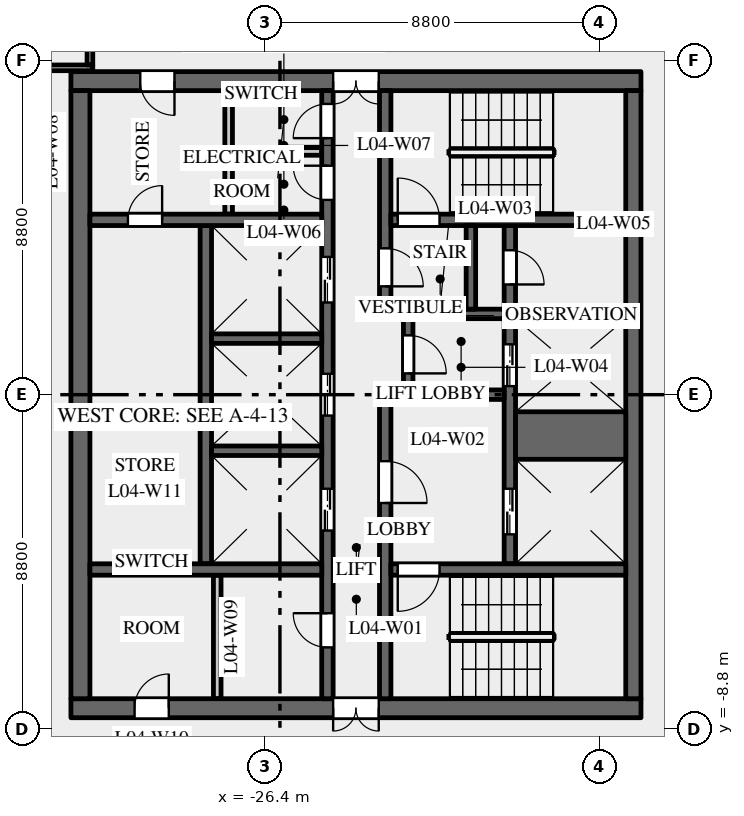
"""IFC4 building model, lengths in metres.
Left out: names, types, materials, properties, quantities, classifications, styles, units other than length and angle.
Written with IfcOpenShell. Run it as: python <this file> out.ifc"""

import sys

from ifc_helpers import new_model, si_unit, direction, frame, frame_2d, origin, place, context, subcontext, project, spatial, rectangle, extrude, element, fill, save


model = new_model("IFC4")
c1 = context("Model", 3, precision=1e-05, world=origin(), true_north=direction((0.0, 1.0)))
c2 = subcontext(c1, "Body", "Model", "MODEL_VIEW")
j1 = project(units=[si_unit("LENGTHUNIT", "METRE"), si_unit("PLANEANGLEUNIT", "RADIAN")], contexts=[c1])
p1 = place(None, origin())
s1 = spatial("IfcSite", under=j1, at=p1, CompositionType="ELEMENT")
p2 = place(p1, origin())
s2 = spatial("IfcBuilding", under=s1, at=p2, CompositionType="ELEMENT")
p3 = place(p2, frame((0.0, 0.0, 25.0)))
s3 = spatial("IfcBuildingStorey", under=s2, at=p3, CompositionType="ELEMENT", Elevation=25.0)
p4 = place(p3, frame((-16.5, 8.25, 0.0), z_axis=(0.0, 0.0, 1.0), x_axis=(-1.0, 0.0, 0.0)))
e1 = element("IfcWall", 1, at=p4, inside=s3, PredefinedType="SHEAR", context=c2, shape_type="SweptSolid", body=[
    extrude(rectangle(XDim=15.0, YDim=0.5, at=frame_2d((7.5, 0.0))), origin(), (0.0, 0.0, 1.0), 5.2),
])
p5 = place(p4, frame((6.9, 0.0, 0.0)))
e2 = element("IfcOpeningElement", 2, at=p5, cuts=e1, PredefinedType="OPENING", context=c2, shape_type="SweptSolid", body=[
    extrude(rectangle(XDim=1.2, YDim=2.1, at=frame_2d((0.6, 1.05))), frame((0.0, 0.26, 0.0), z_axis=(0.0, -1.0, 0.0), x_axis=(1.0, 0.0, 0.0)), (0.0, 0.0, 1.0), 0.52),
])
p6 = place(p4, frame((12.275, 0.0, 0.0)))
e3 = element("IfcOpeningElement", 3, at=p6, cuts=e1, PredefinedType="OPENING", context=c2, shape_type="SweptSolid", body=[
    extrude(rectangle(XDim=0.9, YDim=2.1, at=frame_2d((0.45, 1.05))), frame((0.0, 0.26, 0.0), z_axis=(0.0, -1.0, 0.0), x_axis=(1.0, 0.0, 0.0)), (0.0, 0.0, 1.0), 0.52),
])
p7 = place(p3, frame((-16.5, -8.25, 0.0), z_axis=(0.0, 0.0, 1.0), x_axis=(-1.0, 0.0, 0.0)))
e4 = element("IfcWall", 4, at=p7, inside=s3, PredefinedType="SHEAR", context=c2, shape_type="SweptSolid", body=[
    extrude(rectangle(XDim=15.0, YDim=0.5, at=frame_2d((7.5, 0.0))), origin(), (0.0, 0.0, 1.0), 5.2),
])
p8 = place(p7, frame((6.9, 0.0, 0.0)))
e5 = element("IfcOpeningElement", 5, at=p8, cuts=e4, PredefinedType="OPENING", context=c2, shape_type="SweptSolid", body=[
    extrude(rectangle(XDim=1.2, YDim=2.1, at=frame_2d((0.6, 1.05))), frame((0.0, 0.26, 0.0), z_axis=(0.0, -1.0, 0.0), x_axis=(1.0, 0.0, 0.0)), (0.0, 0.0, 1.0), 0.52),
])
p9 = place(p7, frame((12.425, 0.0, 0.0)))
e6 = element("IfcOpeningElement", 6, at=p9, cuts=e4, PredefinedType="OPENING", context=c2, shape_type="SweptSolid", body=[
    extrude(rectangle(XDim=0.9, YDim=2.1, at=frame_2d((0.45, 1.05))), frame((0.0, 0.26, 0.0), z_axis=(0.0, -1.0, 0.0), x_axis=(1.0, 0.0, 0.0)), (0.0, 0.0, 1.0), 0.52),
])
p10 = place(p3, frame((-27.95, -4.45, 0.0), z_axis=(0.0, 0.0, 1.0), x_axis=(0.0, 1.0, 0.0)))
e7 = element("IfcWall", 7, at=p10, inside=s3, PredefinedType="SHEAR", context=c2, shape_type="SweptSolid", body=[
    extrude(rectangle(XDim=8.9, YDim=0.3, at=frame_2d((4.45, 0.0))), origin(), (0.0, 0.0, 1.0), 5.2),
])
p11 = place(p3, frame((-19.95, -4.45, 0.0), z_axis=(0.0, 0.0, 1.0), x_axis=(0.0, 1.0, 0.0)))
e8 = element("IfcWall", 8, at=p11, inside=s3, PredefinedType="SHEAR", context=c2, shape_type="SweptSolid", body=[
    extrude(rectangle(XDim=8.9, YDim=0.3, at=frame_2d((4.45, 0.0))), origin(), (0.0, 0.0, 1.0), 5.2),
])
p12 = place(p11, frame((0.775, 0.0, 0.0)))
e9 = element("IfcOpeningElement", 9, at=p12, cuts=e8, PredefinedType="OPENING", context=c2, shape_type="SweptSolid", body=[
    extrude(rectangle(XDim=1.2, YDim=2.1, at=frame_2d((0.6, 1.05))), frame((0.0, 0.16, 0.0), z_axis=(0.0, -1.0, 0.0), x_axis=(1.0, 0.0, 0.0)), (0.0, 0.0, 1.0), 0.32),
])
p13 = place(p11, frame((4.675, 0.0, 0.0)))
e10 = element("IfcOpeningElement", 10, at=p13, cuts=e8, PredefinedType="OPENING", context=c2, shape_type="SweptSolid", body=[
    extrude(rectangle(XDim=1.1, YDim=2.1, at=frame_2d((0.55, 1.05))), frame((0.0, 0.16, 0.0), z_axis=(0.0, -1.0, 0.0), x_axis=(1.0, 0.0, 0.0)), (0.0, 0.0, 1.0), 0.32),
])
p14 = place(p11, frame((7.35, 0.0, 0.0)))
e11 = element("IfcOpeningElement", 11, at=p14, cuts=e8, PredefinedType="OPENING", context=c2, shape_type="SweptSolid", body=[
    extrude(rectangle(XDim=0.9, YDim=2.1, at=frame_2d((0.45, 1.05))), frame((0.0, 0.16, 0.0), z_axis=(0.0, -1.0, 0.0), x_axis=(1.0, 0.0, 0.0)), (0.0, 0.0, 1.0), 0.32),
])
p15 = place(p3, frame((-24.75, -8.0, 0.0), z_axis=(0.0, 0.0, 1.0), x_axis=(0.0, 1.0, 0.0)))
e12 = element("IfcWall", 12, at=p15, inside=s3, PredefinedType="SHEAR", context=c2, shape_type="SweptSolid", body=[
    extrude(rectangle(XDim=16.0, YDim=0.3, at=frame_2d((8.0, 0.0))), origin(), (0.0, 0.0, 1.0), 5.2),
])
p16 = place(p15, frame((4.425, 0.0, 0.0)))
e13 = element("IfcOpeningElement", 13, at=p16, cuts=e12, PredefinedType="OPENING", context=c2, shape_type="SweptSolid", body=[
    extrude(rectangle(XDim=1.1, YDim=2.1, at=frame_2d((0.55, 1.05))), frame((0.0, 0.16, 0.0), z_axis=(0.0, -1.0, 0.0), x_axis=(1.0, 0.0, 0.0)), (0.0, 0.0, 1.0), 0.32),
])
p17 = place(p15, frame((7.45, 0.0, 0.0)))
e14 = element("IfcOpeningElement", 14, at=p17, cuts=e12, PredefinedType="OPENING", context=c2, shape_type="SweptSolid", body=[
    extrude(rectangle(XDim=1.1, YDim=2.1, at=frame_2d((0.55, 1.05))), frame((0.0, 0.16, 0.0), z_axis=(0.0, -1.0, 0.0), x_axis=(1.0, 0.0, 0.0)), (0.0, 0.0, 1.0), 0.32),
])
p18 = place(p15, frame((10.425, 0.0, 0.0)))
e15 = element("IfcOpeningElement", 15, at=p18, cuts=e12, PredefinedType="OPENING", context=c2, shape_type="SweptSolid", body=[
    extrude(rectangle(XDim=1.2, YDim=2.1, at=frame_2d((0.6, 1.05))), frame((0.0, 0.16, 0.0), z_axis=(0.0, -1.0, 0.0), x_axis=(1.0, 0.0, 0.0)), (0.0, 0.0, 1.0), 0.32),
])
p19 = place(p15, frame((13.125, 0.0, 0.0)))
e16 = element("IfcOpeningElement", 16, at=p19, cuts=e12, PredefinedType="OPENING", context=c2, shape_type="SweptSolid", body=[
    extrude(rectangle(XDim=0.9, YDim=2.1, at=frame_2d((0.45, 1.05))), frame((0.0, 0.16, 0.0), z_axis=(0.0, -1.0, 0.0), x_axis=(1.0, 0.0, 0.0)), (0.0, 0.0, 1.0), 0.32),
])
p20 = place(p15, frame((14.75, 0.0, 0.0)))
e17 = element("IfcOpeningElement", 17, at=p20, cuts=e12, PredefinedType="OPENING", context=c2, shape_type="SweptSolid", body=[
    extrude(rectangle(XDim=0.9, YDim=2.1, at=frame_2d((0.45, 1.05))), frame((0.0, 0.16, 0.0), z_axis=(0.0, -1.0, 0.0), x_axis=(1.0, 0.0, 0.0)), (0.0, 0.0, 1.0), 0.32),
])
p21 = place(p15, frame((1.35, 0.0, 0.0)))
e18 = element("IfcOpeningElement", 18, at=p21, cuts=e12, PredefinedType="OPENING", context=c2, shape_type="SweptSolid", body=[
    extrude(rectangle(XDim=0.9, YDim=2.1, at=frame_2d((0.45, 1.05))), frame((0.0, 0.16, 0.0), z_axis=(0.0, -1.0, 0.0), x_axis=(1.0, 0.0, 0.0)), (0.0, 0.0, 1.0), 0.32),
])
p22 = place(p3, frame((-20.1, 0.0, 0.0), z_axis=(0.0, 0.0, 1.0), x_axis=(-1.0, 0.0, 0.0)))
e19 = element("IfcWall", 19, at=p22, inside=s3, PredefinedType="SHEAR", context=c2, shape_type="SweptSolid", body=[
    extrude(rectangle(XDim=3.28, YDim=0.25, at=frame_2d((1.64, 0.0))), origin(), (0.0, 0.0, 1.0), 5.2),
])
p23 = place(p3, frame((-16.7, -8.0, 0.0), z_axis=(0.0, 0.0, 1.0), x_axis=(0.0, 1.0, 0.0)))
e20 = element("IfcWall", 20, at=p23, inside=s3, PredefinedType="SHEAR", context=c2, shape_type="SweptSolid", body=[
    extrude(rectangle(XDim=16.0, YDim=0.4, at=frame_2d((8.0, 0.0))), origin(), (0.0, 0.0, 1.0), 5.2),
])
p24 = place(p3, frame((-22.625, 0.125, 0.0), z_axis=(0.0, 0.0, 1.0), x_axis=(0.0, 1.0, 0.0)))
e21 = element("IfcWall", 21, at=p24, inside=s3, PredefinedType="SHEAR", context=c2, shape_type="SweptSolid", body=[
    extrude(rectangle(XDim=1.875, YDim=0.25, at=frame_2d((0.938, 0.0))), origin(), (0.0, 0.0, 1.0), 5.2),
])
p25 = place(p24, frame((0.435, 0.0, 0.0)))
e22 = element("IfcOpeningElement", 22, at=p25, cuts=e21, PredefinedType="OPENING", context=c2, shape_type="SweptSolid", body=[
    extrude(rectangle(XDim=1.0, YDim=2.1, at=frame_2d((0.5, 1.05))), frame((0.0, 0.135, 0.0), z_axis=(0.0, -1.0, 0.0), x_axis=(1.0, 0.0, 0.0)), (0.0, 0.0, 1.0), 0.27),
])
p26 = place(p3, frame((-31.25, -8.0, 0.0), z_axis=(0.0, 0.0, 1.0), x_axis=(0.0, 1.0, 0.0)))
e23 = element("IfcWall", 23, at=p26, inside=s3, PredefinedType="SHEAR", context=c2, shape_type="SweptSolid", body=[
    extrude(rectangle(XDim=16.0, YDim=0.5, at=frame_2d((8.0, 0.0))), origin(), (0.0, 0.0, 1.0), 5.2),
])
p27 = place(p3, frame((-24.9, 4.6, 0.0), z_axis=(0.0, 0.0, 1.0), x_axis=(-1.0, 0.0, 0.0)))
e24 = element("IfcWall", 24, at=p27, inside=s3, PredefinedType="SHEAR", context=c2, shape_type="SweptSolid", body=[
    extrude(rectangle(XDim=6.1, YDim=0.3, at=frame_2d((3.05, 0.0))), origin(), (0.0, 0.0, 1.0), 5.2),
])
p28 = place(p27, frame((4.2, 0.0, 0.0)))
e25 = element("IfcOpeningElement", 25, at=p28, cuts=e24, PredefinedType="OPENING", context=c2, shape_type="SweptSolid", body=[
    extrude(rectangle(XDim=0.9, YDim=2.1, at=frame_2d((0.45, 1.05))), frame((0.0, 0.16, 0.0), z_axis=(0.0, -1.0, 0.0), x_axis=(1.0, 0.0, 0.0)), (0.0, 0.0, 1.0), 0.32),
])
for number, where, z_axis, x_axis in (
    (26, (-27.35, 4.75, 0.0), (0.0, 0.0, 1.0), (0.0, 1.0, 0.0)),
    (27, (-27.65, -8.0, 0.0), (0.0, 0.0, 1.0), (0.0, 1.0, 0.0)),
):
    element("IfcWall", number, at=place(p3, frame(where, z_axis=z_axis, x_axis=x_axis)), inside=s3, PredefinedType="PARTITIONING", context=c2, shape_type="SweptSolid", body=[
        extrude(rectangle(XDim=3.25, YDim=0.2, at=frame_2d((1.625, 0.0))), origin(), (0.0, 0.0, 1.0), 5.2),
    ])
p29 = place(p3, frame((-24.9, 6.4, 0.0), z_axis=(0.0, 0.0, 1.0), x_axis=(-1.0, 0.0, 0.0)))
e28 = element("IfcWall", 28, at=p29, inside=s3, PredefinedType="PARTITIONING", context=c2, shape_type="SweptSolid", body=[
    extrude(rectangle(XDim=2.35, YDim=0.2, at=frame_2d((1.175, 0.0))), origin(), (0.0, 0.0, 1.0), 5.2),
])
p30 = place(p3, frame((-24.9, -4.6, 0.0), z_axis=(0.0, 0.0, 1.0), x_axis=(-1.0, 0.0, 0.0)))
e29 = element("IfcWall", 29, at=p30, inside=s3, PredefinedType="SHEAR", context=c2, shape_type="SweptSolid", body=[
    extrude(rectangle(XDim=6.1, YDim=0.3, at=frame_2d((3.05, 0.0))), origin(), (0.0, 0.0, 1.0), 5.2),
])
p31 = place(p3, frame((-16.9, -1.075, 0.0), z_axis=(0.0, 0.0, 1.0), x_axis=(-1.0, 0.0, 0.0)))
e30 = element("IfcWall", 30, at=p31, inside=s3, PredefinedType="SHEAR", context=c2, shape_type="SweptSolid", body=[
    extrude(rectangle(XDim=2.9, YDim=1.25, at=frame_2d((1.45, 0.0))), origin(), (0.0, 0.0, 1.0), 5.2),
])
for number, where, z_axis, x_axis in (
    (31, (-16.9, 2.125, 0.0), (0.0, 0.0, 1.0), (-1.0, 0.0, 0.0)),
    (32, (-24.9, -1.475, 0.0), (0.0, 0.0, 1.0), (-1.0, 0.0, 0.0)),
    (33, (-24.9, 1.475, 0.0), (0.0, 0.0, 1.0), (-1.0, 0.0, 0.0)),
):
    element("IfcWall", number, at=place(p3, frame(where, z_axis=z_axis, x_axis=x_axis)), inside=s3, PredefinedType="SHEAR", context=c2, shape_type="SweptSolid", body=[
        extrude(rectangle(XDim=2.9, YDim=0.25, at=frame_2d((1.45, 0.0))), origin(), (0.0, 0.0, 1.0), 5.2),
    ])
p32 = place(p3, frame((-23.23, 2.25, 0.0), z_axis=(0.0, 0.0, 1.0), x_axis=(0.0, 1.0, 0.0)))
e34 = element("IfcWall", 34, at=p32, inside=s3, PredefinedType="SHEAR", context=c2, shape_type="SweptSolid", body=[
    extrude(rectangle(XDim=5.75, YDim=0.3, at=frame_2d((2.875, 0.0))), origin(), (0.0, 0.0, 1.0), 5.2),
])
p33 = place(p32, frame((0.6, 0.0, 0.0)))
e35 = element("IfcOpeningElement", 35, at=p33, cuts=e34, PredefinedType="OPENING", context=c2, shape_type="SweptSolid", body=[
    extrude(rectangle(XDim=1.0, YDim=2.1, at=frame_2d((0.5, 1.05))), frame((0.0, 0.16, 0.0), z_axis=(0.0, -1.0, 0.0), x_axis=(1.0, 0.0, 0.0)), (0.0, 0.0, 1.0), 0.32),
])
p34 = place(p3, frame((-23.23, -8.0, 0.0), z_axis=(0.0, 0.0, 1.0), x_axis=(0.0, 1.0, 0.0)))
e36 = element("IfcWall", 36, at=p34, inside=s3, PredefinedType="SHEAR", context=c2, shape_type="SweptSolid", body=[
    extrude(rectangle(XDim=7.875, YDim=0.3, at=frame_2d((3.938, 0.0))), origin(), (0.0, 0.0, 1.0), 5.2),
])
p35 = place(p34, frame((5.15, 0.0, 0.0)))
e37 = element("IfcOpeningElement", 37, at=p35, cuts=e36, PredefinedType="OPENING", context=c2, shape_type="SweptSolid", body=[
    extrude(rectangle(XDim=1.1, YDim=2.1, at=frame_2d((0.55, 1.05))), frame((0.0, 0.16, 0.0), z_axis=(0.0, -1.0, 0.0), x_axis=(1.0, 0.0, 0.0)), (0.0, 0.0, 1.0), 0.32),
])
p36 = place(p3, frame((-16.9, 4.6, 0.0), z_axis=(0.0, 0.0, 1.0), x_axis=(-1.0, 0.0, 0.0)))
e38 = element("IfcWall", 38, at=p36, inside=s3, PredefinedType="SHEAR", context=c2, shape_type="SweptSolid", body=[
    extrude(rectangle(XDim=6.18, YDim=0.3, at=frame_2d((3.09, 0.0))), origin(), (0.0, 0.0, 1.0), 5.2),
])
p37 = place(p36, frame((4.9, 0.0, 0.0)))
e39 = element("IfcOpeningElement", 39, at=p37, cuts=e38, PredefinedType="OPENING", context=c2, shape_type="SweptSolid", body=[
    extrude(rectangle(XDim=1.1, YDim=2.1, at=frame_2d((0.55, 1.05))), frame((0.0, 0.16, 0.0), z_axis=(0.0, -1.0, 0.0), x_axis=(1.0, 0.0, 0.0)), (0.0, 0.0, 1.0), 0.32),
])
p38 = place(p3, frame((-16.9, -4.6, 0.0), z_axis=(0.0, 0.0, 1.0), x_axis=(-1.0, 0.0, 0.0)))
e40 = element("IfcWall", 40, at=p38, inside=s3, PredefinedType="SHEAR", context=c2, shape_type="SweptSolid", body=[
    extrude(rectangle(XDim=6.18, YDim=0.3, at=frame_2d((3.09, 0.0))), origin(), (0.0, 0.0, 1.0), 5.2),
])
p39 = place(p38, frame((4.9, 0.0, 0.0)))
e41 = element("IfcOpeningElement", 41, at=p39, cuts=e40, PredefinedType="OPENING", context=c2, shape_type="SweptSolid", body=[
    extrude(rectangle(XDim=1.1, YDim=2.1, at=frame_2d((0.55, 1.05))), frame((0.0, 0.16, 0.0), z_axis=(0.0, -1.0, 0.0), x_axis=(1.0, 0.0, 0.0)), (0.0, 0.0, 1.0), 0.32),
])
p40 = place(p3, frame((-20.1, 2.125, 0.0), z_axis=(0.0, 0.0, 1.0), x_axis=(-1.0, 0.0, 0.0)))
e42 = element("IfcWall", 42, at=p40, inside=s3, PredefinedType="SHEAR", context=c2, shape_type="SweptSolid", body=[
    extrude(rectangle(XDim=3.28, YDim=0.25, at=frame_2d((1.64, 0.0))), origin(), (0.0, 0.0, 1.0), 5.2),
])
p41 = place(p3, frame((-20.975, 2.25, 0.0), z_axis=(0.0, 0.0, 1.0), x_axis=(0.0, 1.0, 0.0)))
e43 = element("IfcWall", 43, at=p41, inside=s3, PredefinedType="SHEAR", context=c2, shape_type="SweptSolid", body=[
    extrude(rectangle(XDim=2.2, YDim=0.25, at=frame_2d((1.1, 0.0))), origin(), (0.0, 0.0, 1.0), 5.2),
])
p42 = place(p3, frame((-30.925, 8.6, 0.0), z_axis=(0.0, 0.0, 1.0), x_axis=(-1.0, 0.0, 0.0)))
e44 = element("IfcWall", 44, at=p42, inside=s3, PredefinedType="PARTITIONING", context=c2, shape_type="SweptSolid", body=[
    extrude(rectangle(XDim=8.025, YDim=0.15, at=frame_2d((4.012, 0.0))), origin(), (0.0, 0.0, 1.0), 4.2),
])
p43 = place(p42, frame((4.012, 0.0, 0.0)))
e45 = element("IfcOpeningElement", 45, at=p43, cuts=e44, PredefinedType="OPENING", context=c2, shape_type="SweptSolid", body=[
    extrude(rectangle(XDim=1.0, YDim=2.1, at=frame_2d((0.5, 1.05))), frame((0.0, 0.085, 0.0), z_axis=(0.0, -1.0, 0.0), x_axis=(1.0, 0.0, 0.0)), (0.0, 0.0, 1.0), 0.17),
])
p44 = place(p3, frame((-31.0, 11.925, 0.0), z_axis=(0.0, 0.0, 1.0), x_axis=(0.0, -1.0, 0.0)))
e46 = element("IfcWall", 46, at=p44, inside=s3, PredefinedType="PARTITIONING", context=c2, shape_type="SweptSolid", body=[
    extrude(rectangle(XDim=3.25, YDim=0.15, at=frame_2d((1.625, 0.0))), origin(), (0.0, 0.0, 1.0), 5.2),
])
p45 = place(p12, origin())
e47 = element("IfcDoor", 47, at=p45, inside=s3, OperationType="DOUBLE_DOOR_SLIDING", PredefinedType="DOOR", context=c2, shape_type="SweptSolid", body=[
    extrude(rectangle(XDim=1.2, YDim=2.1, at=frame_2d((0.6, 1.05))), frame((0.0, 0.025, 0.0), z_axis=(0.0, -1.0, 0.0), x_axis=(1.0, 0.0, 0.0)), (0.0, 0.0, 1.0), 0.05),
])
fill(e9, e47)
p46 = place(p13, origin())
e48 = element("IfcDoor", 48, at=p46, inside=s3, OperationType="DOUBLE_DOOR_SLIDING", PredefinedType="DOOR", context=c2, shape_type="SweptSolid", body=[
    extrude(rectangle(XDim=1.1, YDim=2.1, at=frame_2d((0.55, 1.05))), frame((0.0, 0.025, 0.0), z_axis=(0.0, -1.0, 0.0), x_axis=(1.0, 0.0, 0.0)), (0.0, 0.0, 1.0), 0.05),
])
fill(e10, e48)
p47 = place(p16, origin())
e49 = element("IfcDoor", 49, at=p47, inside=s3, OperationType="DOUBLE_DOOR_SLIDING", PredefinedType="DOOR", context=c2, shape_type="SweptSolid", body=[
    extrude(rectangle(XDim=1.1, YDim=2.1, at=frame_2d((0.55, 1.05))), frame((0.0, 0.025, 0.0), z_axis=(0.0, -1.0, 0.0), x_axis=(1.0, 0.0, 0.0)), (0.0, 0.0, 1.0), 0.05),
])
fill(e13, e49)
p48 = place(p17, origin())
e50 = element("IfcDoor", 50, at=p48, inside=s3, OperationType="DOUBLE_DOOR_SLIDING", PredefinedType="DOOR", context=c2, shape_type="SweptSolid", body=[
    extrude(rectangle(XDim=1.1, YDim=2.1, at=frame_2d((0.55, 1.05))), frame((0.0, 0.025, 0.0), z_axis=(0.0, -1.0, 0.0), x_axis=(1.0, 0.0, 0.0)), (0.0, 0.0, 1.0), 0.05),
])
fill(e14, e50)
p49 = place(p18, origin())
e51 = element("IfcDoor", 51, at=p49, inside=s3, OperationType="DOUBLE_DOOR_SLIDING", PredefinedType="DOOR", context=c2, shape_type="SweptSolid", body=[
    extrude(rectangle(XDim=1.2, YDim=2.1, at=frame_2d((0.6, 1.05))), frame((0.0, 0.025, 0.0), z_axis=(0.0, -1.0, 0.0), x_axis=(1.0, 0.0, 0.0)), (0.0, 0.0, 1.0), 0.05),
])
fill(e15, e51)
p50 = place(p37, origin())
e52 = element("IfcDoor", 52, at=p50, inside=s3, OperationType="SINGLE_SWING_RIGHT", PredefinedType="DOOR", context=c2, shape_type="SweptSolid", body=[
    extrude(rectangle(XDim=1.1, YDim=2.1, at=frame_2d((0.55, 1.05))), frame((0.0, 0.025, 0.0), z_axis=(0.0, -1.0, 0.0), x_axis=(1.0, 0.0, 0.0)), (0.0, 0.0, 1.0), 0.05),
])
fill(e39, e52)
p51 = place(p39, origin())
e53 = element("IfcDoor", 53, at=p51, inside=s3, OperationType="SINGLE_SWING_LEFT", PredefinedType="DOOR", context=c2, shape_type="SweptSolid", body=[
    extrude(rectangle(XDim=1.1, YDim=2.1, at=frame_2d((0.55, 1.05))), frame((0.0, 0.025, 0.0), z_axis=(0.0, -1.0, 0.0), x_axis=(1.0, 0.0, 0.0)), (0.0, 0.0, 1.0), 0.05),
])
fill(e41, e53)
p52 = place(p35, origin())
e54 = element("IfcDoor", 54, at=p52, inside=s3, OperationType="SINGLE_SWING_LEFT", PredefinedType="DOOR", context=c2, shape_type="SweptSolid", body=[
    extrude(rectangle(XDim=1.1, YDim=2.1, at=frame_2d((0.55, 1.05))), frame((0.0, 0.025, 0.0), z_axis=(0.0, -1.0, 0.0), x_axis=(1.0, 0.0, 0.0)), (0.0, 0.0, 1.0), 0.05),
])
fill(e37, e54)
p53 = place(p33, origin())
e55 = element("IfcDoor", 55, at=p53, inside=s3, OperationType="SINGLE_SWING_LEFT", PredefinedType="DOOR", context=c2, shape_type="SweptSolid", body=[
    extrude(rectangle(XDim=1.0, YDim=2.1, at=frame_2d((0.5, 1.05))), frame((0.0, 0.025, 0.0), z_axis=(0.0, -1.0, 0.0), x_axis=(1.0, 0.0, 0.0)), (0.0, 0.0, 1.0), 0.05),
])
fill(e35, e55)
p54 = place(p25, origin())
e56 = element("IfcDoor", 56, at=p54, inside=s3, OperationType="SINGLE_SWING_LEFT", PredefinedType="DOOR", context=c2, shape_type="SweptSolid", body=[
    extrude(rectangle(XDim=1.0, YDim=2.1, at=frame_2d((0.5, 1.05))), frame((0.0, 0.025, 0.0), z_axis=(0.0, -1.0, 0.0), x_axis=(1.0, 0.0, 0.0)), (0.0, 0.0, 1.0), 0.05),
])
fill(e22, e56)
p55 = place(p5, origin())
e57 = element("IfcDoor", 57, at=p55, inside=s3, OperationType="DOUBLE_DOOR_DOUBLE_SWING", PredefinedType="DOOR", context=c2, shape_type="SweptSolid", body=[
    extrude(rectangle(XDim=1.2, YDim=2.1, at=frame_2d((0.6, 1.05))), frame((0.0, 0.025, 0.0), z_axis=(0.0, -1.0, 0.0), x_axis=(1.0, 0.0, 0.0)), (0.0, 0.0, 1.0), 0.05),
])
fill(e2, e57)
p56 = place(p8, origin())
e58 = element("IfcDoor", 58, at=p56, inside=s3, OperationType="DOUBLE_DOOR_DOUBLE_SWING", PredefinedType="DOOR", context=c2, shape_type="SweptSolid", body=[
    extrude(rectangle(XDim=1.2, YDim=2.1, at=frame_2d((0.6, 1.05))), frame((0.0, 0.025, 0.0), z_axis=(0.0, -1.0, 0.0), x_axis=(1.0, 0.0, 0.0)), (0.0, 0.0, 1.0), 0.05),
])
fill(e5, e58)
p57 = place(p14, origin())
e59 = element("IfcDoor", 59, at=p57, inside=s3, OperationType="SINGLE_SWING_LEFT", PredefinedType="DOOR", context=c2, shape_type="SweptSolid", body=[
    extrude(rectangle(XDim=0.9, YDim=2.1, at=frame_2d((0.45, 1.05))), frame((0.0, 0.025, 0.0), z_axis=(0.0, -1.0, 0.0), x_axis=(1.0, 0.0, 0.0)), (0.0, 0.0, 1.0), 0.05),
])
fill(e11, e59)
p58 = place(p19, origin())
e60 = element("IfcDoor", 60, at=p58, inside=s3, OperationType="SINGLE_SWING_LEFT", PredefinedType="DOOR", context=c2, shape_type="SweptSolid", body=[
    extrude(rectangle(XDim=0.9, YDim=2.1, at=frame_2d((0.45, 1.05))), frame((0.0, 0.025, 0.0), z_axis=(0.0, -1.0, 0.0), x_axis=(1.0, 0.0, 0.0)), (0.0, 0.0, 1.0), 0.05),
])
fill(e16, e60)
p59 = place(p20, origin())
e61 = element("IfcDoor", 61, at=p59, inside=s3, OperationType="SINGLE_SWING_RIGHT", PredefinedType="DOOR", context=c2, shape_type="SweptSolid", body=[
    extrude(rectangle(XDim=0.9, YDim=2.1, at=frame_2d((0.45, 1.05))), frame((0.0, 0.025, 0.0), z_axis=(0.0, -1.0, 0.0), x_axis=(1.0, 0.0, 0.0)), (0.0, 0.0, 1.0), 0.05),
])
fill(e17, e61)
p60 = place(p6, origin())
e62 = element("IfcDoor", 62, at=p60, inside=s3, OperationType="SINGLE_SWING_RIGHT", PredefinedType="DOOR", context=c2, shape_type="SweptSolid", body=[
    extrude(rectangle(XDim=0.9, YDim=2.1, at=frame_2d((0.45, 1.05))), frame((0.0, 0.025, 0.0), z_axis=(0.0, -1.0, 0.0), x_axis=(1.0, 0.0, 0.0)), (0.0, 0.0, 1.0), 0.05),
])
fill(e3, e62)
p61 = place(p21, origin())
e63 = element("IfcDoor", 63, at=p61, inside=s3, OperationType="SINGLE_SWING_LEFT", PredefinedType="DOOR", context=c2, shape_type="SweptSolid", body=[
    extrude(rectangle(XDim=0.9, YDim=2.1, at=frame_2d((0.45, 1.05))), frame((0.0, 0.025, 0.0), z_axis=(0.0, -1.0, 0.0), x_axis=(1.0, 0.0, 0.0)), (0.0, 0.0, 1.0), 0.05),
])
fill(e18, e63)
p62 = place(p9, origin())
e64 = element("IfcDoor", 64, at=p62, inside=s3, OperationType="SINGLE_SWING_LEFT", PredefinedType="DOOR", context=c2, shape_type="SweptSolid", body=[
    extrude(rectangle(XDim=0.9, YDim=2.1, at=frame_2d((0.45, 1.05))), frame((0.0, 0.025, 0.0), z_axis=(0.0, -1.0, 0.0), x_axis=(1.0, 0.0, 0.0)), (0.0, 0.0, 1.0), 0.05),
])
fill(e6, e64)
p63 = place(p28, origin())
e65 = element("IfcDoor", 65, at=p63, inside=s3, OperationType="SINGLE_SWING_LEFT", PredefinedType="DOOR", context=c2, shape_type="SweptSolid", body=[
    extrude(rectangle(XDim=0.9, YDim=2.1, at=frame_2d((0.45, 1.05))), frame((0.0, 0.025, 0.0), z_axis=(0.0, -1.0, 0.0), x_axis=(1.0, 0.0, 0.0)), (0.0, 0.0, 1.0), 0.05),
])
fill(e25, e65)
save(model, sys.argv[1])
